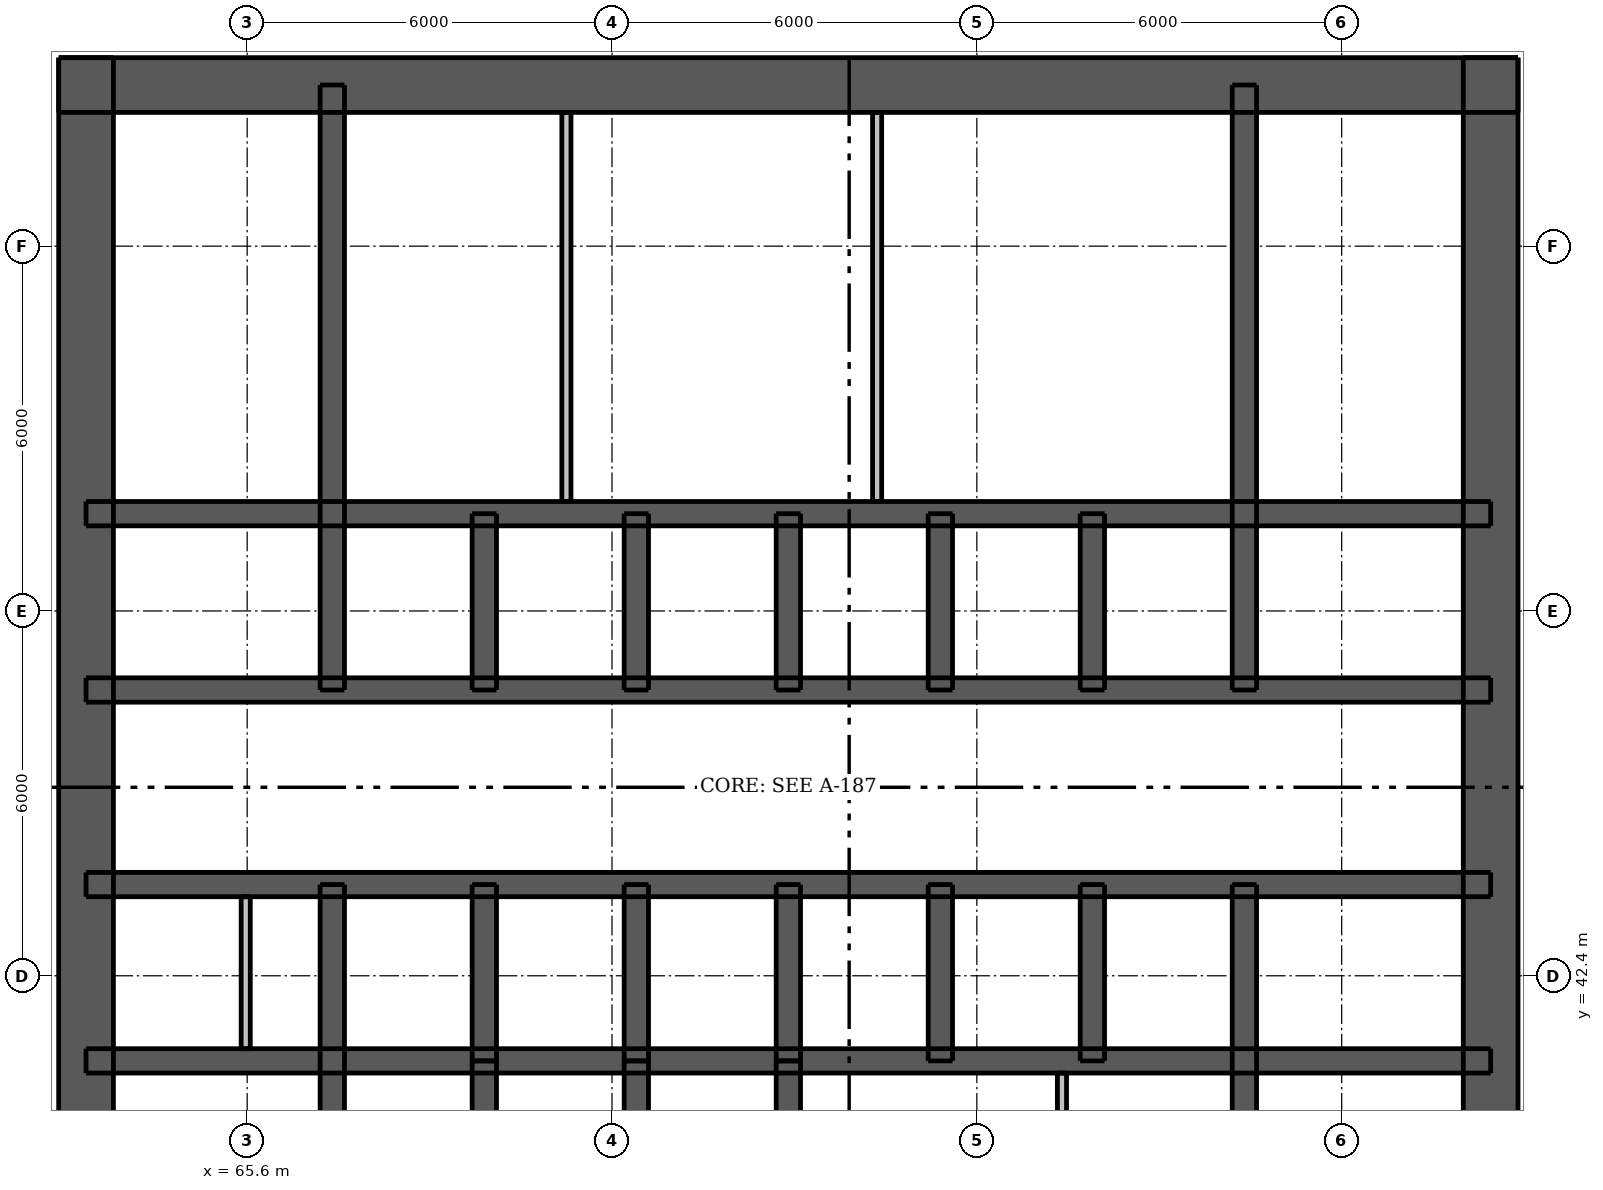
"""IFC4 building model, lengths in metres.
Left out: names, types, materials, properties, quantities, classifications, styles, units other than length and angle.
Written with IfcOpenShell. Run it as: python <this file> out.ifc"""

import sys

from ifc_helpers import new_model, si_unit, direction, frame, frame_2d, origin, place, context, subcontext, project, spatial, rectangle, extrude, element, fill, save


model = new_model("IFC4")
c1 = context("Model", 3, precision=1e-05, world=origin(), true_north=direction((0.0, 1.0)))
c2 = subcontext(c1, "Body", "Model", "MODEL_VIEW")
j1 = project(units=[si_unit("LENGTHUNIT", "METRE"), si_unit("PLANEANGLEUNIT", "RADIAN")], contexts=[c1])
p1 = place(None, origin())
s1 = spatial("IfcSite", under=j1, at=p1, CompositionType="ELEMENT")
p2 = place(p1, origin())
s2 = spatial("IfcBuilding", under=s1, at=p2, CompositionType="ELEMENT")
p3 = place(p2, frame((0.0, 0.0, 46.6)))
s3 = spatial("IfcBuildingStorey", under=s2, at=p3, CompositionType="ELEMENT", Elevation=46.6)
p4 = place(p3, frame((62.5, 57.05, 0.0), z_axis=(0.0, 0.0, 1.0), x_axis=(1.0, 0.0, 0.0)))
e1 = element("IfcWall", 1, at=p4, inside=s3, PredefinedType="SHEAR", context=c2, shape_type="SweptSolid", body=[
    extrude(rectangle(XDim=24.0, YDim=0.9, at=frame_2d((12.0, 0.0))), origin(), (0.0, 0.0, 1.0), 3.05),
])
p5 = place(p4, frame((20.85, 0.0, 0.0)))
e2 = element("IfcOpeningElement", 2, at=p5, cuts=e1, PredefinedType="OPENING", context=c2, shape_type="SweptSolid", body=[
    extrude(rectangle(XDim=1.1, YDim=2.1, at=frame_2d((0.55, 1.05))), frame((0.0, 0.46, 0.0), z_axis=(0.0, -1.0, 0.0), x_axis=(1.0, 0.0, 0.0)), (0.0, 0.0, 1.0), 0.92),
])
p6 = place(p4, frame((2.05, 0.0, 0.0)))
e3 = element("IfcOpeningElement", 3, at=p6, cuts=e1, PredefinedType="OPENING", context=c2, shape_type="SweptSolid", body=[
    extrude(rectangle(XDim=1.1, YDim=2.1, at=frame_2d((0.55, 1.05))), frame((0.0, 0.46, 0.0), z_axis=(0.0, -1.0, 0.0), x_axis=(1.0, 0.0, 0.0)), (0.0, 0.0, 1.0), 0.92),
])
p7 = place(p4, frame((6.075, 0.0, 0.0)))
e4 = element("IfcOpeningElement", 4, at=p7, cuts=e1, PredefinedType="OPENING", context=c2, shape_type="SweptSolid", body=[
    extrude(rectangle(XDim=0.9, YDim=2.1, at=frame_2d((0.45, 1.05))), frame((0.0, 0.46, 0.0), z_axis=(0.0, -1.0, 0.0), x_axis=(1.0, 0.0, 0.0)), (0.0, 0.0, 1.0), 0.92),
])
p8 = place(p4, frame((10.455, 0.0, 0.0)))
e5 = element("IfcOpeningElement", 5, at=p8, cuts=e1, PredefinedType="OPENING", context=c2, shape_type="SweptSolid", body=[
    extrude(rectangle(XDim=0.9, YDim=2.1, at=frame_2d((0.45, 1.05))), frame((0.0, 0.46, 0.0), z_axis=(0.0, -1.0, 0.0), x_axis=(1.0, 0.0, 0.0)), (0.0, 0.0, 1.0), 0.92),
])
p9 = place(p4, frame((15.93, 0.0, 0.0)))
e6 = element("IfcOpeningElement", 6, at=p9, cuts=e1, PredefinedType="OPENING", context=c2, shape_type="SweptSolid", body=[
    extrude(rectangle(XDim=0.9, YDim=2.1, at=frame_2d((0.45, 1.05))), frame((0.0, 0.46, 0.0), z_axis=(0.0, -1.0, 0.0), x_axis=(1.0, 0.0, 0.0)), (0.0, 0.0, 1.0), 0.92),
])
p10 = place(p3, frame((62.95, 33.5, 0.0), z_axis=(0.0, 0.0, 1.0), x_axis=(0.0, 1.0, 0.0)))
e7 = element("IfcWall", 7, at=p10, inside=s3, PredefinedType="SHEAR", context=c2, shape_type="SweptSolid", body=[
    extrude(rectangle(XDim=24.0, YDim=0.9, at=frame_2d((12.0, 0.0))), origin(), (0.0, 0.0, 1.0), 3.05),
])
p11 = place(p10, frame((11.2, 0.0, 0.0)))
e8 = element("IfcOpeningElement", 8, at=p11, cuts=e7, PredefinedType="OPENING", context=c2, shape_type="SweptSolid", body=[
    extrude(rectangle(XDim=1.6, YDim=2.1, at=frame_2d((0.8, 1.05))), frame((0.0, 0.46, 0.0), z_axis=(0.0, -1.0, 0.0), x_axis=(1.0, 0.0, 0.0)), (0.0, 0.0, 1.0), 0.92),
])
p12 = place(p3, frame((86.05, 33.5, 0.0), z_axis=(0.0, 0.0, 1.0), x_axis=(0.0, 1.0, 0.0)))
e9 = element("IfcWall", 9, at=p12, inside=s3, PredefinedType="SHEAR", context=c2, shape_type="SweptSolid", body=[
    extrude(rectangle(XDim=24.0, YDim=0.9, at=frame_2d((12.0, 0.0))), origin(), (0.0, 0.0, 1.0), 3.05),
])
p13 = place(p12, frame((11.2, 0.0, 0.0)))
e10 = element("IfcOpeningElement", 10, at=p13, cuts=e9, PredefinedType="OPENING", context=c2, shape_type="SweptSolid", body=[
    extrude(rectangle(XDim=1.6, YDim=2.1, at=frame_2d((0.8, 1.05))), frame((0.0, 0.46, 0.0), z_axis=(0.0, -1.0, 0.0), x_axis=(1.0, 0.0, 0.0)), (0.0, 0.0, 1.0), 0.92),
])
p14 = place(p3, frame((62.95, 41.0, 0.0), z_axis=(0.0, 0.0, 1.0), x_axis=(1.0, 0.0, 0.0)))
e11 = element("IfcWall", 11, at=p14, inside=s3, PredefinedType="SHEAR", context=c2, shape_type="SweptSolid", body=[
    extrude(rectangle(XDim=23.1, YDim=0.4, at=frame_2d((11.55, 0.0))), origin(), (0.0, 0.0, 1.0), 3.05),
])
p15 = place(p3, frame((62.95, 43.9, 0.0), z_axis=(0.0, 0.0, 1.0), x_axis=(1.0, 0.0, 0.0)))
e12 = element("IfcWall", 12, at=p15, inside=s3, PredefinedType="SHEAR", context=c2, shape_type="SweptSolid", body=[
    extrude(rectangle(XDim=23.1, YDim=0.4, at=frame_2d((11.55, 0.0))), origin(), (0.0, 0.0, 1.0), 3.05),
])
p16 = place(p15, frame((1.088, 0.0, 0.0)))
e13 = element("IfcOpeningElement", 13, at=p16, cuts=e12, PredefinedType="OPENING", context=c2, shape_type="SweptSolid", body=[
    extrude(rectangle(XDim=0.9, YDim=2.1, at=frame_2d((0.45, 1.05))), frame((0.0, 0.21, 0.0), z_axis=(0.0, -1.0, 0.0), x_axis=(1.0, 0.0, 0.0)), (0.0, 0.0, 1.0), 0.42),
])
p17 = place(p15, frame((2.838, 0.0, 0.0)))
e14 = element("IfcOpeningElement", 14, at=p17, cuts=e12, PredefinedType="OPENING", context=c2, shape_type="SweptSolid", body=[
    extrude(rectangle(XDim=0.8, YDim=2.1, at=frame_2d((0.4, 1.05))), frame((0.0, 0.21, 0.0), z_axis=(0.0, -1.0, 0.0), x_axis=(1.0, 0.0, 0.0)), (0.0, 0.0, 1.0), 0.42),
])
p18 = place(p15, frame((20.5, 0.0, 0.0)))
e15 = element("IfcOpeningElement", 15, at=p18, cuts=e12, PredefinedType="OPENING", context=c2, shape_type="SweptSolid", body=[
    extrude(rectangle(XDim=0.9, YDim=2.1, at=frame_2d((0.45, 1.05))), frame((0.0, 0.21, 0.0), z_axis=(0.0, -1.0, 0.0), x_axis=(1.0, 0.0, 0.0)), (0.0, 0.0, 1.0), 0.42),
])
p19 = place(p15, frame((4.75, 0.0, 0.0)))
e16 = element("IfcOpeningElement", 16, at=p19, cuts=e12, PredefinedType="OPENING", context=c2, shape_type="SweptSolid", body=[
    extrude(rectangle(XDim=1.1, YDim=2.1, at=frame_2d((0.55, 1.05))), frame((0.0, 0.21, 0.0), z_axis=(0.0, -1.0, 0.0), x_axis=(1.0, 0.0, 0.0)), (0.0, 0.0, 1.0), 0.42),
])
p20 = place(p15, frame((7.25, 0.0, 0.0)))
e17 = element("IfcOpeningElement", 17, at=p20, cuts=e12, PredefinedType="OPENING", context=c2, shape_type="SweptSolid", body=[
    extrude(rectangle(XDim=1.1, YDim=2.1, at=frame_2d((0.55, 1.05))), frame((0.0, 0.21, 0.0), z_axis=(0.0, -1.0, 0.0), x_axis=(1.0, 0.0, 0.0)), (0.0, 0.0, 1.0), 0.42),
])
p21 = place(p15, frame((9.75, 0.0, 0.0)))
e18 = element("IfcOpeningElement", 18, at=p21, cuts=e12, PredefinedType="OPENING", context=c2, shape_type="SweptSolid", body=[
    extrude(rectangle(XDim=1.1, YDim=2.1, at=frame_2d((0.55, 1.05))), frame((0.0, 0.21, 0.0), z_axis=(0.0, -1.0, 0.0), x_axis=(1.0, 0.0, 0.0)), (0.0, 0.0, 1.0), 0.42),
])
p22 = place(p15, frame((12.25, 0.0, 0.0)))
e19 = element("IfcOpeningElement", 19, at=p22, cuts=e12, PredefinedType="OPENING", context=c2, shape_type="SweptSolid", body=[
    extrude(rectangle(XDim=1.1, YDim=2.1, at=frame_2d((0.55, 1.05))), frame((0.0, 0.21, 0.0), z_axis=(0.0, -1.0, 0.0), x_axis=(1.0, 0.0, 0.0)), (0.0, 0.0, 1.0), 0.42),
])
p23 = place(p15, frame((14.75, 0.0, 0.0)))
e20 = element("IfcOpeningElement", 20, at=p23, cuts=e12, PredefinedType="OPENING", context=c2, shape_type="SweptSolid", body=[
    extrude(rectangle(XDim=1.1, YDim=2.1, at=frame_2d((0.55, 1.05))), frame((0.0, 0.21, 0.0), z_axis=(0.0, -1.0, 0.0), x_axis=(1.0, 0.0, 0.0)), (0.0, 0.0, 1.0), 0.42),
])
p24 = place(p15, frame((17.25, 0.0, 0.0)))
e21 = element("IfcOpeningElement", 21, at=p24, cuts=e12, PredefinedType="OPENING", context=c2, shape_type="SweptSolid", body=[
    extrude(rectangle(XDim=1.1, YDim=2.1, at=frame_2d((0.55, 1.05))), frame((0.0, 0.21, 0.0), z_axis=(0.0, -1.0, 0.0), x_axis=(1.0, 0.0, 0.0)), (0.0, 0.0, 1.0), 0.42),
])
p25 = place(p3, frame((62.95, 47.1, 0.0), z_axis=(0.0, 0.0, 1.0), x_axis=(1.0, 0.0, 0.0)))
e22 = element("IfcWall", 22, at=p25, inside=s3, PredefinedType="SHEAR", context=c2, shape_type="SweptSolid", body=[
    extrude(rectangle(XDim=23.1, YDim=0.4, at=frame_2d((11.55, 0.0))), origin(), (0.0, 0.0, 1.0), 3.05),
])
p26 = place(p25, frame((1.7, 0.0, 0.0)))
e23 = element("IfcOpeningElement", 23, at=p26, cuts=e22, PredefinedType="OPENING", context=c2, shape_type="SweptSolid", body=[
    extrude(rectangle(XDim=0.9, YDim=2.1, at=frame_2d((0.45, 1.05))), frame((0.0, 0.21, 0.0), z_axis=(0.0, -1.0, 0.0), x_axis=(1.0, 0.0, 0.0)), (0.0, 0.0, 1.0), 0.42),
])
p27 = place(p25, frame((20.5, 0.0, 0.0)))
e24 = element("IfcOpeningElement", 24, at=p27, cuts=e22, PredefinedType="OPENING", context=c2, shape_type="SweptSolid", body=[
    extrude(rectangle(XDim=0.9, YDim=2.1, at=frame_2d((0.45, 1.05))), frame((0.0, 0.21, 0.0), z_axis=(0.0, -1.0, 0.0), x_axis=(1.0, 0.0, 0.0)), (0.0, 0.0, 1.0), 0.42),
])
p28 = place(p3, frame((62.95, 50.0, 0.0), z_axis=(0.0, 0.0, 1.0), x_axis=(1.0, 0.0, 0.0)))
e25 = element("IfcWall", 25, at=p28, inside=s3, PredefinedType="SHEAR", context=c2, shape_type="SweptSolid", body=[
    extrude(rectangle(XDim=23.1, YDim=0.4, at=frame_2d((11.55, 0.0))), origin(), (0.0, 0.0, 1.0), 3.05),
])
p29 = place(p3, frame((67.0, 33.95, 0.0), z_axis=(0.0, 0.0, 1.0), x_axis=(0.0, 1.0, 0.0)))
e26 = element("IfcWall", 26, at=p29, inside=s3, PredefinedType="SHEAR", context=c2, shape_type="SweptSolid", body=[
    extrude(rectangle(XDim=9.95, YDim=0.4, at=frame_2d((4.975, 0.0))), origin(), (0.0, 0.0, 1.0), 3.05),
])
p30 = place(p29, frame((0.65, 0.0, 0.0)))
e27 = element("IfcOpeningElement", 27, at=p30, cuts=e26, PredefinedType="OPENING", context=c2, shape_type="SweptSolid", body=[
    extrude(rectangle(XDim=1.1, YDim=2.1, at=frame_2d((0.55, 1.05))), frame((0.0, 0.21, 0.0), z_axis=(0.0, -1.0, 0.0), x_axis=(1.0, 0.0, 0.0)), (0.0, 0.0, 1.0), 0.42),
])
for number, where, z_axis, x_axis in (
    (28, (67.0, 47.1, 0.0), (0.0, 0.0, 1.0), (0.0, 1.0, 0.0)),
    (29, (82.0, 33.95, 0.0), (0.0, 0.0, 1.0), (0.0, 1.0, 0.0)),
    (30, (82.0, 47.1, 0.0), (0.0, 0.0, 1.0), (0.0, 1.0, 0.0)),
):
    element("IfcWall", number, at=place(p3, frame(where, z_axis=z_axis, x_axis=x_axis)), inside=s3, PredefinedType="SHEAR", context=c2, shape_type="SweptSolid", body=[
        extrude(rectangle(XDim=9.95, YDim=0.4, at=frame_2d((4.975, 0.0))), origin(), (0.0, 0.0, 1.0), 3.05),
    ])
for number, where, z_axis, x_axis in (
    (31, (69.5, 41.0, 0.0), (0.0, 0.0, 1.0), (0.0, 1.0, 0.0)),
    (32, (69.5, 47.1, 0.0), (0.0, 0.0, 1.0), (0.0, 1.0, 0.0)),
    (33, (72.0, 41.0, 0.0), (0.0, 0.0, 1.0), (0.0, 1.0, 0.0)),
    (34, (72.0, 47.1, 0.0), (0.0, 0.0, 1.0), (0.0, 1.0, 0.0)),
    (35, (74.5, 41.0, 0.0), (0.0, 0.0, 1.0), (0.0, 1.0, 0.0)),
    (36, (74.5, 47.1, 0.0), (0.0, 0.0, 1.0), (0.0, 1.0, 0.0)),
    (37, (77.0, 41.0, 0.0), (0.0, 0.0, 1.0), (0.0, 1.0, 0.0)),
    (38, (77.0, 47.1, 0.0), (0.0, 0.0, 1.0), (0.0, 1.0, 0.0)),
    (39, (79.5, 41.0, 0.0), (0.0, 0.0, 1.0), (0.0, 1.0, 0.0)),
    (40, (79.5, 47.1, 0.0), (0.0, 0.0, 1.0), (0.0, 1.0, 0.0)),
    (41, (69.5, 38.1, 0.0), (0.0, 0.0, 1.0), (0.0, 1.0, 0.0)),
    (42, (72.0, 38.1, 0.0), (0.0, 0.0, 1.0), (0.0, 1.0, 0.0)),
    (43, (74.5, 38.1, 0.0), (0.0, 0.0, 1.0), (0.0, 1.0, 0.0)),
):
    element("IfcWall", number, at=place(p3, frame(where, z_axis=z_axis, x_axis=x_axis)), inside=s3, PredefinedType="SHEAR", context=c2, shape_type="SweptSolid", body=[
        extrude(rectangle(XDim=2.9, YDim=0.4, at=frame_2d((1.45, 0.0))), origin(), (0.0, 0.0, 1.0), 3.05),
    ])
p31 = place(p3, frame((79.0, 34.4, 0.0), z_axis=(0.0, 0.0, 1.0), x_axis=(0.0, 1.0, 0.0)))
e44 = element("IfcWall", 44, at=p31, inside=s3, PredefinedType="PLUMBINGWALL", context=c2, shape_type="SweptSolid", body=[
    extrude(rectangle(XDim=6.4, YDim=0.15, at=frame_2d((3.2, 0.0))), origin(), (0.0, 0.0, 1.0), 3.05),
])
p32 = place(p3, frame((65.576, 41.2, 0.0), z_axis=(0.0, 0.0, 1.0), x_axis=(0.0, 1.0, 0.0)))
e45 = element("IfcWall", 45, at=p32, inside=s3, PredefinedType="PLUMBINGWALL", context=c2, shape_type="SweptSolid", body=[
    extrude(rectangle(XDim=2.5, YDim=0.15, at=frame_2d((1.25, 0.0))), origin(), (0.0, 0.0, 1.0), 3.05),
])
for number, where, z_axis, x_axis in (
    (46, (70.85, 50.2, 0.0), (0.0, 0.0, 1.0), (0.0, 1.0, 0.0)),
    (47, (75.96, 50.2, 0.0), (0.0, 0.0, 1.0), (0.0, 1.0, 0.0)),
):
    element("IfcWall", number, at=place(p3, frame(where, z_axis=z_axis, x_axis=x_axis)), inside=s3, PredefinedType="PLUMBINGWALL", context=c2, shape_type="SweptSolid", body=[
        extrude(rectangle(XDim=6.4, YDim=0.15, at=frame_2d((3.2, 0.0))), origin(), (0.0, 0.0, 1.0), 3.05),
    ])
p33 = place(p5, origin())
e48 = element("IfcDoor", 48, at=p33, inside=s3, OperationType="SINGLE_SWING_RIGHT", PredefinedType="DOOR", context=c2, shape_type="SweptSolid", body=[
    extrude(rectangle(XDim=1.1, YDim=2.1, at=frame_2d((0.55, 1.05))), frame((0.0, -0.388, 0.0), z_axis=(0.0, -1.0, 0.0), x_axis=(1.0, 0.0, 0.0)), (0.0, 0.0, 1.0), 0.05),
])
fill(e2, e48)
p34 = place(p6, origin())
e49 = element("IfcDoor", 49, at=p34, inside=s3, OperationType="SINGLE_SWING_LEFT", PredefinedType="DOOR", context=c2, shape_type="SweptSolid", body=[
    extrude(rectangle(XDim=1.1, YDim=2.1, at=frame_2d((0.55, 1.05))), frame((0.0, -0.388, 0.0), z_axis=(0.0, -1.0, 0.0), x_axis=(1.0, 0.0, 0.0)), (0.0, 0.0, 1.0), 0.05),
])
fill(e3, e49)
p35 = place(p11, origin())
e50 = element("IfcDoor", 50, at=p35, inside=s3, OperationType="DOUBLE_DOOR_SINGLE_SWING", PredefinedType="DOOR", context=c2, shape_type="SweptSolid", body=[
    extrude(rectangle(XDim=1.6, YDim=2.1, at=frame_2d((0.8, 1.05))), frame((0.0, -0.388, 0.0), z_axis=(0.0, -1.0, 0.0), x_axis=(1.0, 0.0, 0.0)), (0.0, 0.0, 1.0), 0.05),
])
fill(e8, e50)
p36 = place(p13, origin())
e51 = element("IfcDoor", 51, at=p36, inside=s3, OperationType="DOUBLE_DOOR_SINGLE_SWING", PredefinedType="DOOR", context=c2, shape_type="SweptSolid", body=[
    extrude(rectangle(XDim=1.6, YDim=2.1, at=frame_2d((0.8, 1.05))), frame((0.0, 0.438, 0.0), z_axis=(0.0, -1.0, 0.0), x_axis=(1.0, 0.0, 0.0)), (0.0, 0.0, 1.0), 0.05),
])
fill(e10, e51)
p37 = place(p16, origin())
e52 = element("IfcDoor", 52, at=p37, inside=s3, OperationType="SINGLE_SWING_LEFT", PredefinedType="DOOR", context=c2, shape_type="SweptSolid", body=[
    extrude(rectangle(XDim=0.9, YDim=2.1, at=frame_2d((0.45, 1.05))), frame((0.0, -0.138, 0.0), z_axis=(0.0, -1.0, 0.0), x_axis=(1.0, 0.0, 0.0)), (0.0, 0.0, 1.0), 0.05),
])
fill(e13, e52)
p38 = place(p17, origin())
e53 = element("IfcDoor", 53, at=p38, inside=s3, OperationType="SINGLE_SWING_RIGHT", PredefinedType="DOOR", context=c2, shape_type="SweptSolid", body=[
    extrude(rectangle(XDim=0.8, YDim=2.1, at=frame_2d((0.4, 1.05))), frame((0.0, -0.138, 0.0), z_axis=(0.0, -1.0, 0.0), x_axis=(1.0, 0.0, 0.0)), (0.0, 0.0, 1.0), 0.05),
])
fill(e14, e53)
p39 = place(p18, origin())
e54 = element("IfcDoor", 54, at=p39, inside=s3, OperationType="SINGLE_SWING_LEFT", PredefinedType="DOOR", context=c2, shape_type="SweptSolid", body=[
    extrude(rectangle(XDim=0.9, YDim=2.1, at=frame_2d((0.45, 1.05))), frame((0.0, -0.138, 0.0), z_axis=(0.0, -1.0, 0.0), x_axis=(1.0, 0.0, 0.0)), (0.0, 0.0, 1.0), 0.05),
])
fill(e15, e54)
p40 = place(p26, origin())
e55 = element("IfcDoor", 55, at=p40, inside=s3, OperationType="SINGLE_SWING_LEFT", PredefinedType="DOOR", context=c2, shape_type="SweptSolid", body=[
    extrude(rectangle(XDim=0.9, YDim=2.1, at=frame_2d((0.45, 1.05))), frame((0.0, 0.188, 0.0), z_axis=(0.0, -1.0, 0.0), x_axis=(1.0, 0.0, 0.0)), (0.0, 0.0, 1.0), 0.05),
])
fill(e23, e55)
p41 = place(p27, origin())
e56 = element("IfcDoor", 56, at=p41, inside=s3, OperationType="SINGLE_SWING_LEFT", PredefinedType="DOOR", context=c2, shape_type="SweptSolid", body=[
    extrude(rectangle(XDim=0.9, YDim=2.1, at=frame_2d((0.45, 1.05))), frame((0.0, 0.188, 0.0), z_axis=(0.0, -1.0, 0.0), x_axis=(1.0, 0.0, 0.0)), (0.0, 0.0, 1.0), 0.05),
])
fill(e24, e56)
p42 = place(p7, origin())
e57 = element("IfcDoor", 57, at=p42, inside=s3, OperationType="SINGLE_SWING_RIGHT", PredefinedType="DOOR", context=c2, shape_type="SweptSolid", body=[
    extrude(rectangle(XDim=0.9, YDim=2.1, at=frame_2d((0.45, 1.05))), frame((0.0, -0.388, 0.0), z_axis=(0.0, -1.0, 0.0), x_axis=(1.0, 0.0, 0.0)), (0.0, 0.0, 1.0), 0.05),
])
fill(e4, e57)
p43 = place(p8, origin())
e58 = element("IfcDoor", 58, at=p43, inside=s3, OperationType="SINGLE_SWING_RIGHT", PredefinedType="DOOR", context=c2, shape_type="SweptSolid", body=[
    extrude(rectangle(XDim=0.9, YDim=2.1, at=frame_2d((0.45, 1.05))), frame((0.0, -0.388, 0.0), z_axis=(0.0, -1.0, 0.0), x_axis=(1.0, 0.0, 0.0)), (0.0, 0.0, 1.0), 0.05),
])
fill(e5, e58)
p44 = place(p9, origin())
e59 = element("IfcDoor", 59, at=p44, inside=s3, OperationType="SINGLE_SWING_RIGHT", PredefinedType="DOOR", context=c2, shape_type="SweptSolid", body=[
    extrude(rectangle(XDim=0.9, YDim=2.1, at=frame_2d((0.45, 1.05))), frame((0.0, -0.388, 0.0), z_axis=(0.0, -1.0, 0.0), x_axis=(1.0, 0.0, 0.0)), (0.0, 0.0, 1.0), 0.05),
])
fill(e6, e59)
p45 = place(p19, origin())
e60 = element("IfcDoor", 60, at=p45, inside=s3, OperationType="DOUBLE_DOOR_SLIDING", PredefinedType="DOOR", context=c2, shape_type="SweptSolid", body=[
    extrude(rectangle(XDim=1.1, YDim=2.1, at=frame_2d((0.55, 1.05))), frame((0.0, 0.025, 0.0), z_axis=(0.0, -1.0, 0.0), x_axis=(1.0, 0.0, 0.0)), (0.0, 0.0, 1.0), 0.05),
])
fill(e16, e60)
p46 = place(p20, origin())
e61 = element("IfcDoor", 61, at=p46, inside=s3, OperationType="DOUBLE_DOOR_SLIDING", PredefinedType="DOOR", context=c2, shape_type="SweptSolid", body=[
    extrude(rectangle(XDim=1.1, YDim=2.1, at=frame_2d((0.55, 1.05))), frame((0.0, 0.025, 0.0), z_axis=(0.0, -1.0, 0.0), x_axis=(1.0, 0.0, 0.0)), (0.0, 0.0, 1.0), 0.05),
])
fill(e17, e61)
p47 = place(p21, origin())
e62 = element("IfcDoor", 62, at=p47, inside=s3, OperationType="DOUBLE_DOOR_SLIDING", PredefinedType="DOOR", context=c2, shape_type="SweptSolid", body=[
    extrude(rectangle(XDim=1.1, YDim=2.1, at=frame_2d((0.55, 1.05))), frame((0.0, 0.025, 0.0), z_axis=(0.0, -1.0, 0.0), x_axis=(1.0, 0.0, 0.0)), (0.0, 0.0, 1.0), 0.05),
])
fill(e18, e62)
p48 = place(p22, origin())
e63 = element("IfcDoor", 63, at=p48, inside=s3, OperationType="DOUBLE_DOOR_SLIDING", PredefinedType="DOOR", context=c2, shape_type="SweptSolid", body=[
    extrude(rectangle(XDim=1.1, YDim=2.1, at=frame_2d((0.55, 1.05))), frame((0.0, 0.025, 0.0), z_axis=(0.0, -1.0, 0.0), x_axis=(1.0, 0.0, 0.0)), (0.0, 0.0, 1.0), 0.05),
])
fill(e19, e63)
p49 = place(p23, origin())
e64 = element("IfcDoor", 64, at=p49, inside=s3, OperationType="DOUBLE_DOOR_SLIDING", PredefinedType="DOOR", context=c2, shape_type="SweptSolid", body=[
    extrude(rectangle(XDim=1.1, YDim=2.1, at=frame_2d((0.55, 1.05))), frame((0.0, 0.025, 0.0), z_axis=(0.0, -1.0, 0.0), x_axis=(1.0, 0.0, 0.0)), (0.0, 0.0, 1.0), 0.05),
])
fill(e20, e64)
p50 = place(p24, origin())
e65 = element("IfcDoor", 65, at=p50, inside=s3, OperationType="DOUBLE_DOOR_SLIDING", PredefinedType="DOOR", context=c2, shape_type="SweptSolid", body=[
    extrude(rectangle(XDim=1.1, YDim=2.1, at=frame_2d((0.55, 1.05))), frame((0.0, 0.025, 0.0), z_axis=(0.0, -1.0, 0.0), x_axis=(1.0, 0.0, 0.0)), (0.0, 0.0, 1.0), 0.05),
])
fill(e21, e65)
save(model, sys.argv[1])
